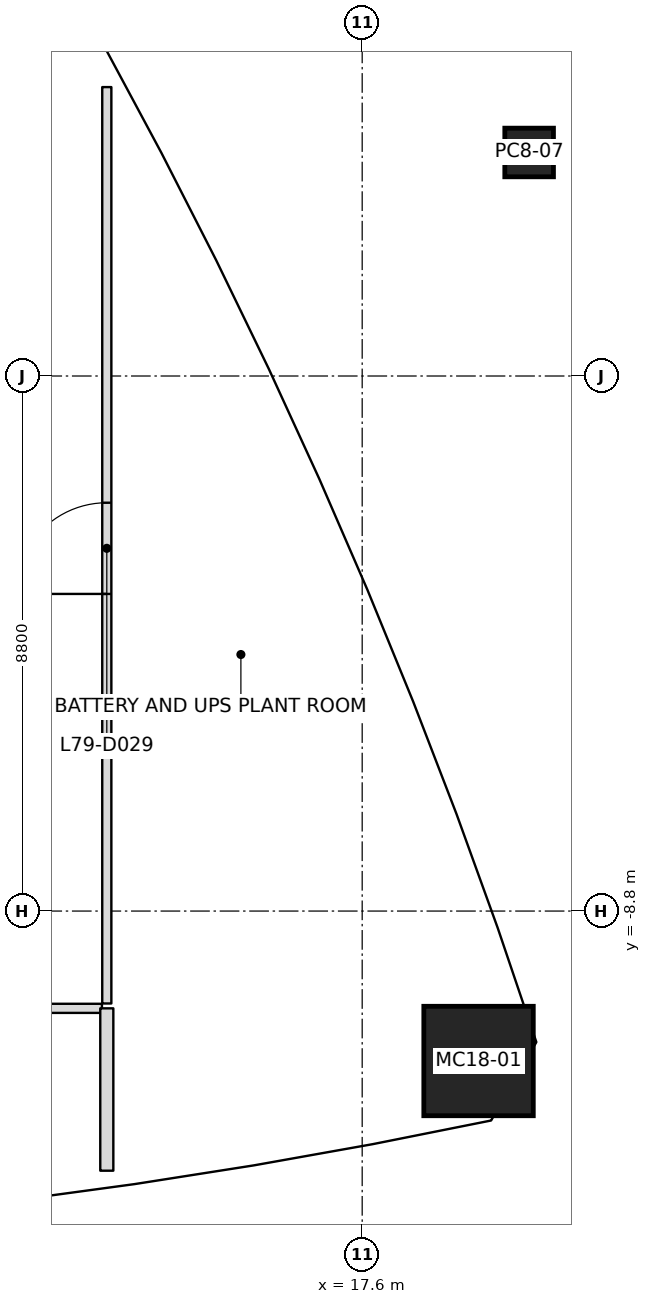
"""IFC4 building model, lengths in metres.
Left out: names, types, materials, properties, quantities, classifications, styles, units other than length and angle.
Written with IfcOpenShell. Run it as: python <this file> out.ifc"""

import sys

from ifc_helpers import new_model, si_unit, direction, frame, frame_2d, origin, origin_2d, place, context, subcontext, project, spatial, rectangle, extrude, element, fill, save


model = new_model("IFC4")
c1 = context("Model", 3, precision=1e-05, world=origin(), true_north=direction((0.0, 1.0)))
c2 = subcontext(c1, "Body", "Model", "MODEL_VIEW")
j1 = project(units=[si_unit("LENGTHUNIT", "METRE"), si_unit("PLANEANGLEUNIT", "RADIAN")], contexts=[c1])
p1 = place(None, origin())
s1 = spatial("IfcSite", under=j1, at=p1, CompositionType="ELEMENT")
p2 = place(p1, origin())
s2 = spatial("IfcBuilding", under=s1, at=p2, CompositionType="ELEMENT")
p3 = place(p2, frame((0.0, 0.0, 355.6)))
s3 = spatial("IfcBuildingStorey", under=s2, at=p3, CompositionType="ELEMENT", Elevation=355.6)
p4 = place(p3, frame((19.514, -11.266, 0.0), z_axis=(0.0, 0.0, 1.0), x_axis=(1.0, 0.0, 0.0)))
e1 = element("IfcColumn", 1, at=p4, inside=s3, PredefinedType="COLUMN", context=c2, shape_type="SweptSolid", body=[
    extrude(rectangle(XDim=1.8, YDim=1.8, at=origin_2d()), origin(), (0.0, 0.0, 1.0), 5.4),
])
p5 = place(p3, frame((20.346, 3.676, 0.0), z_axis=(0.0, 0.0, 1.0), x_axis=(-0.438895015251, 0.898538349537, 0.0)))
e2 = element("IfcColumn", 2, at=p5, inside=s3, PredefinedType="COLUMN", context=c2, shape_type="SweptSolid", body=[
    extrude(rectangle(XDim=0.8, YDim=0.8, at=origin_2d()), origin(), (0.0, 0.0, 1.0), 5.4),
])
p6 = place(p3, frame((13.4, -10.4, 0.0), z_axis=(0.0, 0.0, 1.0), x_axis=(0.0, -1.0, 0.0)))
e3 = element("IfcWall", 3, at=p6, inside=s3, PredefinedType="PARTITIONING", context=c2, shape_type="SweptSolid", body=[
    extrude(rectangle(XDim=2.67, YDim=0.215, at=frame_2d((1.335, 0.0))), origin(), (0.0, 0.0, 1.0), 4.85),
])
p7 = place(p3, frame((-13.32, -10.4, 0.0), z_axis=(0.0, 0.0, 1.0), x_axis=(1.0, 0.0, 0.0)))
e4 = element("IfcWall", 4, at=p7, inside=s3, PredefinedType="PARTITIONING", context=c2, shape_type="SweptSolid", body=[
    extrude(rectangle(XDim=26.64, YDim=0.15, at=frame_2d((13.32, 0.0))), origin(), (0.0, 0.0, 1.0), 4.643),
])
p8 = place(p7, frame((5.32, 0.0, 0.0)))
e5 = element("IfcOpeningElement", 5, at=p8, cuts=e4, PredefinedType="OPENING", context=c2, shape_type="SweptSolid", body=[
    extrude(rectangle(XDim=1.0, YDim=2.4, at=frame_2d((0.5, 1.2))), frame((0.0, 0.075, 0.0), z_axis=(0.0, -1.0, 0.0), x_axis=(1.0, 0.0, 0.0)), (0.0, 0.0, 1.0), 0.15),
])
p9 = place(p7, frame((18.72, 0.0, 0.0)))
e6 = element("IfcOpeningElement", 6, at=p9, cuts=e4, PredefinedType="OPENING", context=c2, shape_type="SweptSolid", body=[
    extrude(rectangle(XDim=1.0, YDim=2.4, at=frame_2d((0.5, 1.2))), frame((0.0, 0.075, 0.0), z_axis=(0.0, -1.0, 0.0), x_axis=(1.0, 0.0, 0.0)), (0.0, 0.0, 1.0), 0.15),
])
p10 = place(p3, frame((13.4, -10.32, 0.0), z_axis=(0.0, 0.0, 1.0), x_axis=(0.0, 1.0, 0.0)))
e7 = element("IfcWall", 7, at=p10, inside=s3, PredefinedType="PARTITIONING", context=c2, shape_type="SweptSolid", body=[
    extrude(rectangle(XDim=15.072, YDim=0.15, at=frame_2d((7.536, 0.0))), origin(), (0.0, 0.0, 1.0), 4.497),
])
p11 = place(p10, frame((6.736, 0.0, 0.0)))
e8 = element("IfcOpeningElement", 8, at=p11, cuts=e7, PredefinedType="OPENING", context=c2, shape_type="SweptSolid", body=[
    extrude(rectangle(XDim=1.5, YDim=2.4, at=frame_2d((0.75, 1.2))), frame((0.0, 0.075, 0.0), z_axis=(0.0, -1.0, 0.0), x_axis=(1.0, 0.0, 0.0)), (0.0, 0.0, 1.0), 0.15),
])
p12 = place(p11, origin())
e9 = element("IfcDoor", 9, at=p12, inside=s3, OperationType="DOUBLE_DOOR_SINGLE_SWING", PredefinedType="DOOR", context=c2, shape_type="SweptSolid", body=[
    extrude(rectangle(XDim=1.5, YDim=2.4, at=frame_2d((0.75, 1.2))), frame((0.0, 0.025, 0.0), z_axis=(0.0, -1.0, 0.0), x_axis=(1.0, 0.0, 0.0)), (0.0, 0.0, 1.0), 0.05),
])
fill(e8, e9)
save(model, sys.argv[1])
